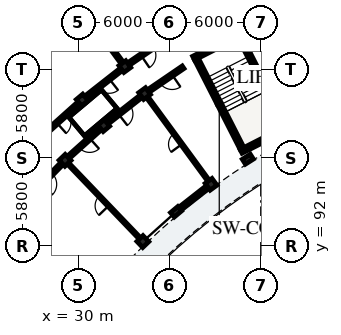
"""IFC4 building model, lengths in metres.
Left out: names, types, materials, properties, quantities, classifications, styles, units other than length and angle.
Written with IfcOpenShell. Run it as: python <this file> out.ifc"""

import sys

from ifc_helpers import new_model, si_unit, direction, frame, frame_2d, origin, origin_2d, place, context, subcontext, project, spatial, rectangle, extrude, element, fill, save


model = new_model("IFC4")
c1 = context("Model", 3, precision=1e-05, world=origin(), true_north=direction((0.0, 1.0)))
c2 = subcontext(c1, "Body", "Model", "MODEL_VIEW")
j1 = project(units=[si_unit("LENGTHUNIT", "METRE"), si_unit("PLANEANGLEUNIT", "RADIAN")], contexts=[c1])
p1 = place(None, origin())
s1 = spatial("IfcSite", under=j1, at=p1, CompositionType="ELEMENT")
p2 = place(p1, origin())
s2 = spatial("IfcBuilding", under=s1, at=p2, CompositionType="ELEMENT")
p3 = place(p2, frame((0.0, 0.0, 22.28)))
s3 = spatial("IfcBuildingStorey", under=s2, at=p3, CompositionType="ELEMENT", Elevation=22.28)
p4 = place(p3, frame((37.773, 104.296, 0.0), z_axis=(0.0, 0.0, 1.0), x_axis=(0.453992276384, -0.891005618941, 0.0)))
e1 = element("IfcWall", 1, at=p4, inside=s3, PredefinedType="SHEAR", context=c2, shape_type="SweptSolid", body=[
    extrude(rectangle(XDim=6.6, YDim=0.28, at=frame_2d((3.3, 0.0))), origin(), (0.0, 0.0, 1.0), 3.11),
])
for number, where, z_axis, x_axis in (
    (2, (40.709, 98.227, 0.0), (0.0, 0.0, 1.0), (0.891, 0.454, 0.0)),
    (3, (37.585, 104.357, 0.0), (0.0, 0.0, 1.0), (0.891, 0.454, 0.0)),
):
    element("IfcWall", number, at=place(p3, frame(where, z_axis=z_axis, x_axis=x_axis)), inside=s3, PredefinedType="SHEAR", context=c2, shape_type="SweptSolid", body=[
        extrude(rectangle(XDim=3.48, YDim=0.28, at=frame_2d((1.74, 0.0))), origin(), (0.0, 0.0, 1.0), 3.11),
    ])
p5 = place(p3, frame((40.625, 105.748, 0.0), z_axis=(0.0, 0.0, 1.0), x_axis=(0.453992276384, -0.891005618941, 0.0)))
e4 = element("IfcWall", 4, at=p5, inside=s3, PredefinedType="SHEAR", context=c2, shape_type="SweptSolid", body=[
    extrude(rectangle(XDim=6.6, YDim=0.28, at=frame_2d((3.3, 0.0))), origin(), (0.0, 0.0, 1.0), 3.11),
])
p6 = place(p5, frame((0.22, 0.0, 0.0)))
e5 = element("IfcOpeningElement", 5, at=p6, cuts=e4, PredefinedType="OPENING", context=c2, shape_type="SweptSolid", body=[
    extrude(rectangle(XDim=1.05, YDim=2.15, at=frame_2d((0.525, 1.075))), frame((0.0, 0.15, 0.0), z_axis=(0.0, -1.0, 0.0), x_axis=(1.0, 0.0, 0.0)), (0.0, 0.0, 1.0), 0.3),
])
p7 = place(p3, frame((41.153, 97.712, 0.0), z_axis=(0.0, 0.0, 1.0), x_axis=(-0.536481603385, 0.843912015099, 0.0)))
e6 = element("IfcColumn", 6, at=p7, inside=s3, PredefinedType="PILASTER", context=c2, shape_type="SweptSolid", body=[
    extrude(rectangle(XDim=0.38, YDim=0.62, at=origin_2d()), origin(), (0.0, 0.0, 1.0), 3.11),
])
for number, where, z_axis, x_axis in (
    (7, (38.734, 96.059, 0.0), (0.0, 0.0, 1.0), (-0.591, 0.807, 0.0)),
    (8, (34.361, 102.029, 0.0), (0.0, 0.0, 1.0), (-0.591, 0.807, 0.0)),
    (9, (33.061, 103.804, 0.0), (0.0, 0.0, 1.0), (-0.591, 0.807, 0.0)),
):
    element("IfcColumn", number, at=place(p3, frame(where, z_axis=z_axis, x_axis=x_axis)), inside=s3, PredefinedType="COLUMN", context=c2, shape_type="SweptSolid", body=[
        extrude(rectangle(XDim=0.55, YDim=0.55, at=origin_2d()), origin(), (0.0, 0.0, 1.0), 3.11),
    ])
p8 = place(p3, frame((36.428, 94.251, 0.0), z_axis=(0.0, 0.0, 1.0), x_axis=(-0.642787636427, 0.766044420681, 0.0)))
e10 = element("IfcColumn", 10, at=p8, inside=s3, PredefinedType="PILASTER", context=c2, shape_type="SweptSolid", body=[
    extrude(rectangle(XDim=0.38, YDim=0.62, at=origin_2d()), origin(), (0.0, 0.0, 1.0), 3.11),
])
for number, where, z_axis, x_axis in (
    (11, (31.671, 99.919, 0.0), (0.0, 0.0, 1.0), (-0.643, 0.766, 0.0)),
    (12, (30.257, 101.605, 0.0), (0.0, 0.0, 1.0), (-0.643, 0.766, 0.0)),
    (13, (34.247, 92.294, 0.0), (0.0, 0.0, 1.0), (-0.692, 0.722, 0.0)),
    (14, (29.127, 97.637, 0.0), (0.0, 0.0, 1.0), (-0.692, 0.722, 0.0)),
):
    element("IfcColumn", number, at=place(p3, frame(where, z_axis=z_axis, x_axis=x_axis)), inside=s3, PredefinedType="COLUMN", context=c2, shape_type="SweptSolid", body=[
        extrude(rectangle(XDim=0.55, YDim=0.55, at=origin_2d()), origin(), (0.0, 0.0, 1.0), 3.11),
    ])
p9 = place(p3, frame((38.541, 95.908, 0.0), z_axis=(0.0, 0.0, 1.0), x_axis=(-0.786831325151, -0.617168101704, 0.0)))
e15 = element("IfcWall", 15, at=p9, inside=s3, PredefinedType="SOLIDWALL", context=c2, shape_type="SweptSolid", body=[
    extrude(rectangle(XDim=2.525, YDim=0.245, at=frame_2d((1.263, 0.0))), origin(), (0.0, 0.0, 1.0), 2.355),
])
p10 = place(p9, frame((0.663, 0.0, 0.55)))
e16 = element("IfcOpeningElement", 16, at=p10, cuts=e15, PredefinedType="OPENING", context=c2, shape_type="SweptSolid", body=[
    extrude(rectangle(XDim=1.2, YDim=1.55, at=frame_2d((0.6, 0.775))), frame((0.0, 0.133, 0.0), z_axis=(0.0, -1.0, 0.0), x_axis=(1.0, 0.0, 0.0)), (0.0, 0.0, 1.0), 0.265),
])
p11 = place(p3, frame((35.714, 105.616, 0.0), z_axis=(0.0, 0.0, 1.0), x_axis=(-0.825779671787, -0.563992848947, 0.0)))
e17 = element("IfcWall", 17, at=p11, inside=s3, PredefinedType="PARTITIONING", context=c2, shape_type="SweptSolid", body=[
    extrude(rectangle(XDim=2.863, YDim=0.205, at=frame_2d((1.432, 0.0))), origin(), (0.0, 0.0, 1.0), 2.37),
])
p12 = place(p11, frame((0.947, 0.0, 0.0)))
e18 = element("IfcOpeningElement", 18, at=p12, cuts=e17, PredefinedType="OPENING", context=c2, shape_type="SweptSolid", body=[
    extrude(rectangle(XDim=0.97, YDim=2.15, at=frame_2d((0.485, 1.075))), frame((0.0, 0.113, 0.0), z_axis=(0.0, -1.0, 0.0), x_axis=(1.0, 0.0, 0.0)), (0.0, 0.0, 1.0), 0.225),
])
p13 = place(p3, frame((36.895, 103.76, 0.0), z_axis=(0.0, 0.0, 1.0), x_axis=(-0.825752009056, -0.56403334967, 0.0)))
e19 = element("IfcWall", 19, at=p13, inside=s3, PredefinedType="PARTITIONING", context=c2, shape_type="SweptSolid", body=[
    extrude(rectangle(XDim=2.718, YDim=0.205, at=frame_2d((1.359, 0.0))), origin(), (0.0, 0.0, 1.0), 2.37),
])
p14 = place(p13, frame((0.874, 0.0, 0.0)))
e20 = element("IfcOpeningElement", 20, at=p14, cuts=e19, PredefinedType="OPENING", context=c2, shape_type="SweptSolid", body=[
    extrude(rectangle(XDim=0.97, YDim=2.15, at=frame_2d((0.485, 1.075))), frame((0.0, 0.113, 0.0), z_axis=(0.0, -1.0, 0.0), x_axis=(1.0, 0.0, 0.0)), (0.0, 0.0, 1.0), 0.225),
])
p15 = place(p3, frame((32.824, 104.126, 0.0), z_axis=(0.0, 0.0, 1.0), x_axis=(-0.590910940129, 0.806736797745, 0.0)))
e21 = element("IfcWall", 21, at=p15, inside=s3, PredefinedType="PARTITIONING", context=c2, shape_type="SweptSolid", body=[
    extrude(rectangle(XDim=4.7, YDim=0.185, at=frame_2d((2.35, 0.0))), origin(), (0.0, 0.0, 1.0), 2.37),
])
p16 = place(p3, frame((38.497, 96.382, 0.0), z_axis=(0.0, 0.0, 1.0), x_axis=(-0.590924179316, 0.806727100263, 0.0)))
e22 = element("IfcWall", 22, at=p16, inside=s3, PredefinedType="PARTITIONING", context=c2, shape_type="SweptSolid", body=[
    extrude(rectangle(XDim=6.6, YDim=0.125, at=frame_2d((3.3, 0.0))), origin(), (0.0, 0.0, 1.0), 2.37),
])
p17 = place(p16, frame((2.865, 0.0, 0.0)))
e23 = element("IfcOpeningElement", 23, at=p17, cuts=e22, PredefinedType="OPENING", context=c2, shape_type="SweptSolid", body=[
    extrude(rectangle(XDim=0.87, YDim=2.08, at=frame_2d((0.435, 1.04))), frame((0.0, 0.073, 0.0), z_axis=(0.0, -1.0, 0.0), x_axis=(1.0, 0.0, 0.0)), (0.0, 0.0, 1.0), 0.145),
])
p18 = place(p3, frame((32.785, 103.588, 0.0), z_axis=(0.0, 0.0, 1.0), x_axis=(-0.786806323554, -0.617199975061, 0.0)))
e24 = element("IfcWall", 24, at=p18, inside=s3, PredefinedType="PARTITIONING", context=c2, shape_type="SweptSolid", body=[
    extrude(rectangle(XDim=2.863, YDim=0.205, at=frame_2d((1.432, 0.0))), origin(), (0.0, 0.0, 1.0), 2.37),
])
p19 = place(p18, frame((0.957, 0.0, 0.0)))
e25 = element("IfcOpeningElement", 25, at=p19, cuts=e24, PredefinedType="OPENING", context=c2, shape_type="SweptSolid", body=[
    extrude(rectangle(XDim=0.95, YDim=2.13, at=frame_2d((0.475, 1.065))), frame((0.0, 0.113, 0.0), z_axis=(0.0, -1.0, 0.0), x_axis=(1.0, 0.0, 0.0)), (0.0, 0.0, 1.0), 0.225),
])
p20 = place(p3, frame((34.085, 101.813, 0.0), z_axis=(0.0, 0.0, 1.0), x_axis=(-0.786835457019, -0.617162833924, 0.0)))
e26 = element("IfcWall", 26, at=p20, inside=s3, PredefinedType="PARTITIONING", context=c2, shape_type="SweptSolid", body=[
    extrude(rectangle(XDim=2.718, YDim=0.205, at=frame_2d((1.359, 0.0))), origin(), (0.0, 0.0, 1.0), 2.37),
])
p21 = place(p20, frame((0.884, 0.0, 0.0)))
e27 = element("IfcOpeningElement", 27, at=p21, cuts=e26, PredefinedType="OPENING", context=c2, shape_type="SweptSolid", body=[
    extrude(rectangle(XDim=0.95, YDim=2.13, at=frame_2d((0.475, 1.065))), frame((0.0, 0.113, 0.0), z_axis=(0.0, -1.0, 0.0), x_axis=(1.0, 0.0, 0.0)), (0.0, 0.0, 1.0), 0.225),
])
p22 = place(p3, frame((29.997, 101.371, 0.0), z_axis=(0.0, 0.0, 1.0), x_axis=(-0.744433521088, -0.667696587291, 0.0)))
e28 = element("IfcWall", 28, at=p22, inside=s3, PredefinedType="PARTITIONING", context=c2, shape_type="SweptSolid", body=[
    extrude(rectangle(XDim=2.863, YDim=0.205, at=frame_2d((1.432, 0.0))), origin(), (0.0, 0.0, 1.0), 2.37),
])
p23 = place(p22, frame((0.967, 0.0, 0.0)))
e29 = element("IfcOpeningElement", 29, at=p23, cuts=e28, PredefinedType="OPENING", context=c2, shape_type="SweptSolid", body=[
    extrude(rectangle(XDim=0.93, YDim=2.12, at=frame_2d((0.465, 1.06))), frame((0.0, 0.113, 0.0), z_axis=(0.0, -1.0, 0.0), x_axis=(1.0, 0.0, 0.0)), (0.0, 0.0, 1.0), 0.225),
])
p24 = place(p3, frame((31.411, 99.686, 0.0), z_axis=(0.0, 0.0, 1.0), x_axis=(-0.744418559135, -0.667713268413, 0.0)))
e30 = element("IfcWall", 30, at=p24, inside=s3, PredefinedType="PARTITIONING", context=c2, shape_type="SweptSolid", body=[
    extrude(rectangle(XDim=2.718, YDim=0.205, at=frame_2d((1.359, 0.0))), origin(), (0.0, 0.0, 1.0), 2.37),
])
p25 = place(p24, frame((0.894, 0.0, 0.0)))
e31 = element("IfcOpeningElement", 31, at=p25, cuts=e30, PredefinedType="OPENING", context=c2, shape_type="SweptSolid", body=[
    extrude(rectangle(XDim=0.93, YDim=2.12, at=frame_2d((0.465, 1.06))), frame((0.0, 0.113, 0.0), z_axis=(0.0, -1.0, 0.0), x_axis=(1.0, 0.0, 0.0)), (0.0, 0.0, 1.0), 0.225),
])
p26 = place(p3, frame((33.97, 92.583, 0.0), z_axis=(0.0, 0.0, 1.0), x_axis=(-0.691872422458, 0.722019771919, 0.0)))
e32 = element("IfcWall", 32, at=p26, inside=s3, PredefinedType="PARTITIONING", context=c2, shape_type="SweptSolid", body=[
    extrude(rectangle(XDim=6.6, YDim=0.125, at=frame_2d((3.3, 0.0))), origin(), (0.0, 0.0, 1.0), 2.37),
])
p27 = place(p26, frame((2.855, 0.0, 0.0)))
e33 = element("IfcOpeningElement", 33, at=p27, cuts=e32, PredefinedType="OPENING", context=c2, shape_type="SweptSolid", body=[
    extrude(rectangle(XDim=0.89, YDim=2.1, at=frame_2d((0.445, 1.05))), frame((0.0, 0.073, 0.0), z_axis=(0.0, -1.0, 0.0), x_axis=(1.0, 0.0, 0.0)), (0.0, 0.0, 1.0), 0.145),
])
p28 = place(p3, frame((28.882, 97.387, 0.0), z_axis=(0.0, 0.0, 1.0), x_axis=(-0.698840007829, -0.715278018296, 0.0)))
e34 = element("IfcWall", 34, at=p28, inside=s3, PredefinedType="PARTITIONING", context=c2, shape_type="SweptSolid", body=[
    extrude(rectangle(XDim=2.718, YDim=0.205, at=frame_2d((1.359, 0.0))), origin(), (0.0, 0.0, 1.0), 2.37),
])
p29 = place(p28, frame((0.864, 0.0, 0.0)))
e35 = element("IfcOpeningElement", 35, at=p29, cuts=e34, PredefinedType="OPENING", context=c2, shape_type="SweptSolid", body=[
    extrude(rectangle(XDim=0.99, YDim=2.16, at=frame_2d((0.495, 1.08))), frame((0.0, 0.113, 0.0), z_axis=(0.0, -1.0, 0.0), x_axis=(1.0, 0.0, 0.0)), (0.0, 0.0, 1.0), 0.225),
])
p30 = place(p10, origin())
e36 = element("IfcWindow", 36, at=p30, inside=s3, PartitioningType="SINGLE_PANEL", PredefinedType="WINDOW", context=c2, shape_type="SweptSolid", body=[
    extrude(rectangle(XDim=1.2, YDim=1.55, at=frame_2d((0.6, 0.775))), frame((0.0, 0.03, 0.0), z_axis=(0.0, -1.0, 0.0), x_axis=(1.0, 0.0, 0.0)), (0.0, 0.0, 1.0), 0.06),
])
fill(e16, e36)
p31 = place(p6, origin())
e37 = element("IfcDoor", 37, at=p31, inside=s3, OperationType="SINGLE_SWING_LEFT", PredefinedType="DOOR", context=c2, shape_type="SweptSolid", body=[
    extrude(rectangle(XDim=1.05, YDim=2.15, at=frame_2d((0.525, 1.075))), frame((0.0, 0.025, 0.0), z_axis=(0.0, -1.0, 0.0), x_axis=(1.0, 0.0, 0.0)), (0.0, 0.0, 1.0), 0.05),
])
fill(e5, e37)
p32 = place(p12, origin())
e38 = element("IfcDoor", 38, at=p32, inside=s3, OperationType="SINGLE_SWING_RIGHT", PredefinedType="DOOR", context=c2, shape_type="SweptSolid", body=[
    extrude(rectangle(XDim=0.97, YDim=2.15, at=frame_2d((0.485, 1.075))), frame((0.0, 0.025, 0.0), z_axis=(0.0, -1.0, 0.0), x_axis=(1.0, 0.0, 0.0)), (0.0, 0.0, 1.0), 0.05),
])
fill(e18, e38)
p33 = place(p14, origin())
e39 = element("IfcDoor", 39, at=p33, inside=s3, OperationType="SINGLE_SWING_LEFT", PredefinedType="DOOR", context=c2, shape_type="SweptSolid", body=[
    extrude(rectangle(XDim=0.97, YDim=2.15, at=frame_2d((0.485, 1.075))), frame((0.0, 0.025, 0.0), z_axis=(0.0, -1.0, 0.0), x_axis=(1.0, 0.0, 0.0)), (0.0, 0.0, 1.0), 0.05),
])
fill(e20, e39)
p34 = place(p17, origin())
e40 = element("IfcDoor", 40, at=p34, inside=s3, OperationType="SINGLE_SWING_LEFT", PredefinedType="DOOR", context=c2, shape_type="SweptSolid", body=[
    extrude(rectangle(XDim=0.87, YDim=2.08, at=frame_2d((0.435, 1.04))), frame((0.0, 0.025, 0.0), z_axis=(0.0, -1.0, 0.0), x_axis=(1.0, 0.0, 0.0)), (0.0, 0.0, 1.0), 0.05),
])
fill(e23, e40)
p35 = place(p19, origin())
e41 = element("IfcDoor", 41, at=p35, inside=s3, OperationType="SINGLE_SWING_LEFT", PredefinedType="DOOR", context=c2, shape_type="SweptSolid", body=[
    extrude(rectangle(XDim=0.95, YDim=2.13, at=frame_2d((0.475, 1.065))), frame((0.0, 0.025, 0.0), z_axis=(0.0, -1.0, 0.0), x_axis=(1.0, 0.0, 0.0)), (0.0, 0.0, 1.0), 0.05),
])
fill(e25, e41)
p36 = place(p21, origin())
e42 = element("IfcDoor", 42, at=p36, inside=s3, OperationType="SINGLE_SWING_RIGHT", PredefinedType="DOOR", context=c2, shape_type="SweptSolid", body=[
    extrude(rectangle(XDim=0.95, YDim=2.13, at=frame_2d((0.475, 1.065))), frame((0.0, 0.025, 0.0), z_axis=(0.0, -1.0, 0.0), x_axis=(1.0, 0.0, 0.0)), (0.0, 0.0, 1.0), 0.05),
])
fill(e27, e42)
p37 = place(p23, origin())
e43 = element("IfcDoor", 43, at=p37, inside=s3, OperationType="SINGLE_SWING_RIGHT", PredefinedType="DOOR", context=c2, shape_type="SweptSolid", body=[
    extrude(rectangle(XDim=0.93, YDim=2.12, at=frame_2d((0.465, 1.06))), frame((0.0, 0.025, 0.0), z_axis=(0.0, -1.0, 0.0), x_axis=(1.0, 0.0, 0.0)), (0.0, 0.0, 1.0), 0.05),
])
fill(e29, e43)
p38 = place(p25, origin())
e44 = element("IfcDoor", 44, at=p38, inside=s3, OperationType="SINGLE_SWING_LEFT", PredefinedType="DOOR", context=c2, shape_type="SweptSolid", body=[
    extrude(rectangle(XDim=0.93, YDim=2.12, at=frame_2d((0.465, 1.06))), frame((0.0, 0.025, 0.0), z_axis=(0.0, -1.0, 0.0), x_axis=(1.0, 0.0, 0.0)), (0.0, 0.0, 1.0), 0.05),
])
fill(e31, e44)
p39 = place(p27, origin())
e45 = element("IfcDoor", 45, at=p39, inside=s3, OperationType="SINGLE_SWING_LEFT", PredefinedType="DOOR", context=c2, shape_type="SweptSolid", body=[
    extrude(rectangle(XDim=0.89, YDim=2.1, at=frame_2d((0.445, 1.05))), frame((0.0, 0.025, 0.0), z_axis=(0.0, -1.0, 0.0), x_axis=(1.0, 0.0, 0.0)), (0.0, 0.0, 1.0), 0.05),
])
fill(e33, e45)
save(model, sys.argv[1])
